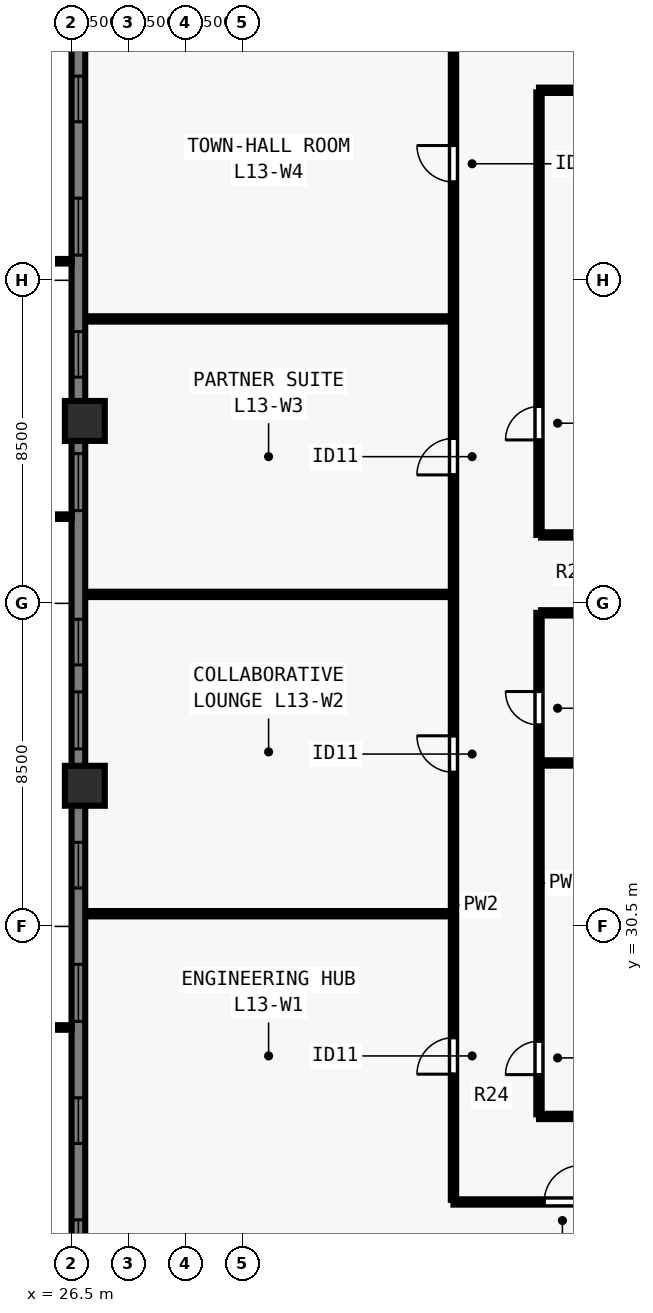
"""IFC4 building model, lengths in metres.
Left out: names, types, materials, properties, quantities, classifications, styles, units other than length and angle.
Written with IfcOpenShell. Run it as: python <this file> out.ifc"""

import sys

from ifc_helpers import new_model, si_unit, direction, frame, frame_2d, origin, origin_2d, place, context, subcontext, project, spatial, rectangle, extrude, element, fill, save


model = new_model("IFC4")
c1 = context("Model", 3, precision=1e-05, world=origin(), true_north=direction((0.0, 1.0)))
c2 = subcontext(c1, "Body", "Model", "MODEL_VIEW")
j1 = project(units=[si_unit("LENGTHUNIT", "METRE"), si_unit("PLANEANGLEUNIT", "RADIAN")], contexts=[c1])
p1 = place(None, origin())
s1 = spatial("IfcSite", under=j1, at=p1, CompositionType="ELEMENT")
p2 = place(p1, origin())
s2 = spatial("IfcBuilding", under=s1, at=p2, CompositionType="ELEMENT")
p3 = place(p2, frame((0.0, 0.0, 51.5)))
s3 = spatial("IfcBuildingStorey", under=s2, at=p3, CompositionType="ELEMENT", Elevation=51.5)
for number, where, z_axis, x_axis in (
    (1, (26.85, 43.8, 0.0), (0.0, 0.0, 1.0), (0.0, 1.0, 0.0)),
    (2, (26.85, 34.2, 0.0), (0.0, 0.0, 1.0), (0.0, 1.0, 0.0)),
):
    element("IfcColumn", number, at=place(p3, frame(where, z_axis=z_axis, x_axis=x_axis)), inside=s3, PredefinedType="COLUMN", context=c2, shape_type="SweptSolid", body=[
        extrude(rectangle(XDim=1.05, YDim=1.05, at=origin_2d()), origin(), (0.0, 0.0, 1.0), 3.5),
    ])
p4 = place(p3, frame((26.68, 16.5, 0.0), z_axis=(0.0, 0.0, 1.0), x_axis=(0.0, 1.0, 0.0)))
e3 = element("IfcWall", 3, at=p4, inside=s3, PredefinedType="SOLIDWALL", context=c2, shape_type="SweptSolid", body=[
    extrude(rectangle(XDim=44.662, YDim=0.36, at=frame_2d((22.331, 0.0))), origin(), (0.0, 0.0, 1.0), 3.28),
])
p5 = place(p4, frame((4.78, 0.0, 0.8)))
e4 = element("IfcOpeningElement", 4, at=p5, cuts=e3, PredefinedType="OPENING", context=c2, shape_type="SweptSolid", body=[
    extrude(rectangle(XDim=1.5, YDim=1.544, at=frame_2d((0.75, 0.772))), frame((0.0, 0.19, 0.0), z_axis=(0.0, -1.0, 0.0), x_axis=(1.0, 0.0, 0.0)), (0.0, 0.0, 1.0), 0.38),
])
p6 = place(p4, frame((8.29, 0.0, 0.8)))
e5 = element("IfcOpeningElement", 5, at=p6, cuts=e3, PredefinedType="OPENING", context=c2, shape_type="SweptSolid", body=[
    extrude(rectangle(XDim=1.2, YDim=1.544, at=frame_2d((0.6, 0.772))), frame((0.0, 0.19, 0.0), z_axis=(0.0, -1.0, 0.0), x_axis=(1.0, 0.0, 0.0)), (0.0, 0.0, 1.0), 0.38),
])
p7 = place(p4, frame((11.5, 0.0, 0.8)))
e6 = element("IfcOpeningElement", 6, at=p7, cuts=e3, PredefinedType="OPENING", context=c2, shape_type="SweptSolid", body=[
    extrude(rectangle(XDim=1.5, YDim=1.544, at=frame_2d((0.75, 0.772))), frame((0.0, 0.19, 0.0), z_axis=(0.0, -1.0, 0.0), x_axis=(1.0, 0.0, 0.0)), (0.0, 0.0, 1.0), 0.38),
])
p8 = place(p4, frame((15.01, 0.0, 0.8)))
e7 = element("IfcOpeningElement", 7, at=p8, cuts=e3, PredefinedType="OPENING", context=c2, shape_type="SweptSolid", body=[
    extrude(rectangle(XDim=1.2, YDim=1.544, at=frame_2d((0.6, 0.772))), frame((0.0, 0.19, 0.0), z_axis=(0.0, -1.0, 0.0), x_axis=(1.0, 0.0, 0.0)), (0.0, 0.0, 1.0), 0.38),
])
p9 = place(p4, frame((18.671, 0.0, 0.8)))
e8 = element("IfcOpeningElement", 8, at=p9, cuts=e3, PredefinedType="OPENING", context=c2, shape_type="SweptSolid", body=[
    extrude(rectangle(XDim=1.5, YDim=1.544, at=frame_2d((0.75, 0.772))), frame((0.0, 0.19, 0.0), z_axis=(0.0, -1.0, 0.0), x_axis=(1.0, 0.0, 0.0)), (0.0, 0.0, 1.0), 0.38),
])
p10 = place(p4, frame((20.881, 0.0, 0.8)))
e9 = element("IfcOpeningElement", 9, at=p10, cuts=e3, PredefinedType="OPENING", context=c2, shape_type="SweptSolid", body=[
    extrude(rectangle(XDim=1.2, YDim=1.544, at=frame_2d((0.6, 0.772))), frame((0.0, 0.19, 0.0), z_axis=(0.0, -1.0, 0.0), x_axis=(1.0, 0.0, 0.0)), (0.0, 0.0, 1.0), 0.38),
])
p11 = place(p4, frame((24.941, 0.0, 0.8)))
e10 = element("IfcOpeningElement", 10, at=p11, cuts=e3, PredefinedType="OPENING", context=c2, shape_type="SweptSolid", body=[
    extrude(rectangle(XDim=1.5, YDim=1.544, at=frame_2d((0.75, 0.772))), frame((0.0, 0.19, 0.0), z_axis=(0.0, -1.0, 0.0), x_axis=(1.0, 0.0, 0.0)), (0.0, 0.0, 1.0), 0.38),
])
p12 = place(p4, frame((28.451, 0.0, 0.8)))
e11 = element("IfcOpeningElement", 11, at=p12, cuts=e3, PredefinedType="OPENING", context=c2, shape_type="SweptSolid", body=[
    extrude(rectangle(XDim=1.2, YDim=1.544, at=frame_2d((0.6, 0.772))), frame((0.0, 0.19, 0.0), z_axis=(0.0, -1.0, 0.0), x_axis=(1.0, 0.0, 0.0)), (0.0, 0.0, 1.0), 0.38),
])
p13 = place(p4, frame((31.662, 0.0, 0.8)))
e12 = element("IfcOpeningElement", 12, at=p13, cuts=e3, PredefinedType="OPENING", context=c2, shape_type="SweptSolid", body=[
    extrude(rectangle(XDim=1.5, YDim=1.544, at=frame_2d((0.75, 0.772))), frame((0.0, 0.19, 0.0), z_axis=(0.0, -1.0, 0.0), x_axis=(1.0, 0.0, 0.0)), (0.0, 0.0, 1.0), 0.38),
])
p14 = place(p4, frame((35.172, 0.0, 0.8)))
e13 = element("IfcOpeningElement", 13, at=p14, cuts=e3, PredefinedType="OPENING", context=c2, shape_type="SweptSolid", body=[
    extrude(rectangle(XDim=1.2, YDim=1.544, at=frame_2d((0.6, 0.772))), frame((0.0, 0.19, 0.0), z_axis=(0.0, -1.0, 0.0), x_axis=(1.0, 0.0, 0.0)), (0.0, 0.0, 1.0), 0.38),
])
p15 = place(p4, frame((38.382, 0.0, 0.8)))
e14 = element("IfcOpeningElement", 14, at=p15, cuts=e3, PredefinedType="OPENING", context=c2, shape_type="SweptSolid", body=[
    extrude(rectangle(XDim=1.5, YDim=1.544, at=frame_2d((0.75, 0.772))), frame((0.0, 0.19, 0.0), z_axis=(0.0, -1.0, 0.0), x_axis=(1.0, 0.0, 0.0)), (0.0, 0.0, 1.0), 0.38),
])
p16 = place(p3, frame((36.55, 23.25, 0.0), z_axis=(0.0, 0.0, 1.0), x_axis=(1.0, 0.0, 0.0)))
e15 = element("IfcWall", 15, at=p16, inside=s3, PredefinedType="PARTITIONING", context=c2, shape_type="SweptSolid", body=[
    extrude(rectangle(XDim=30.9, YDim=0.14, at=frame_2d((15.45, 0.0))), origin(), (0.0, 0.0, 1.0), 3.28),
])
p17 = place(p16, frame((2.386, 0.0, 0.0)))
e16 = element("IfcOpeningElement", 16, at=p17, cuts=e15, PredefinedType="OPENING", context=c2, shape_type="SweptSolid", body=[
    extrude(rectangle(XDim=0.96, YDim=2.12, at=frame_2d((0.48, 1.06))), frame((0.0, 0.08, 0.0), z_axis=(0.0, -1.0, 0.0), x_axis=(1.0, 0.0, 0.0)), (0.0, 0.0, 1.0), 0.16),
])
p18 = place(p16, frame((27.066, 0.0, 0.0)))
e17 = element("IfcOpeningElement", 17, at=p18, cuts=e15, PredefinedType="OPENING", context=c2, shape_type="SweptSolid", body=[
    extrude(rectangle(XDim=0.96, YDim=2.12, at=frame_2d((0.48, 1.06))), frame((0.0, 0.08, 0.0), z_axis=(0.0, -1.0, 0.0), x_axis=(1.0, 0.0, 0.0)), (0.0, 0.0, 1.0), 0.16),
])
p19 = place(p3, frame((36.55, 23.305, 0.0), z_axis=(0.0, 0.0, 1.0), x_axis=(0.0, 1.0, 0.0)))
e18 = element("IfcWall", 18, at=p19, inside=s3, PredefinedType="PARTITIONING", context=c2, shape_type="SweptSolid", body=[
    extrude(rectangle(XDim=31.39, YDim=0.14, at=frame_2d((15.695, 0.0))), origin(), (0.0, 0.0, 1.0), 3.28),
])
p20 = place(p19, frame((3.307, 0.0, 0.0)))
e19 = element("IfcOpeningElement", 19, at=p20, cuts=e18, PredefinedType="OPENING", context=c2, shape_type="SweptSolid", body=[
    extrude(rectangle(XDim=0.96, YDim=2.12, at=frame_2d((0.48, 1.06))), frame((0.0, 0.08, 0.0), z_axis=(0.0, -1.0, 0.0), x_axis=(1.0, 0.0, 0.0)), (0.0, 0.0, 1.0), 0.16),
])
p21 = place(p19, frame((11.25, 0.0, 0.0)))
e20 = element("IfcOpeningElement", 20, at=p21, cuts=e18, PredefinedType="OPENING", context=c2, shape_type="SweptSolid", body=[
    extrude(rectangle(XDim=0.96, YDim=2.12, at=frame_2d((0.48, 1.06))), frame((0.0, 0.08, 0.0), z_axis=(0.0, -1.0, 0.0), x_axis=(1.0, 0.0, 0.0)), (0.0, 0.0, 1.0), 0.16),
])
p22 = place(p19, frame((19.075, 0.0, 0.0)))
e21 = element("IfcOpeningElement", 21, at=p22, cuts=e18, PredefinedType="OPENING", context=c2, shape_type="SweptSolid", body=[
    extrude(rectangle(XDim=0.96, YDim=2.12, at=frame_2d((0.48, 1.06))), frame((0.0, 0.08, 0.0), z_axis=(0.0, -1.0, 0.0), x_axis=(1.0, 0.0, 0.0)), (0.0, 0.0, 1.0), 0.16),
])
p23 = place(p19, frame((26.782, 0.0, 0.0)))
e22 = element("IfcOpeningElement", 22, at=p23, cuts=e18, PredefinedType="OPENING", context=c2, shape_type="SweptSolid", body=[
    extrude(rectangle(XDim=0.96, YDim=2.12, at=frame_2d((0.48, 1.06))), frame((0.0, 0.08, 0.0), z_axis=(0.0, -1.0, 0.0), x_axis=(1.0, 0.0, 0.0)), (0.0, 0.0, 1.0), 0.16),
])
p24 = place(p3, frame((38.8, 25.5, 0.0), z_axis=(0.0, 0.0, 1.0), x_axis=(1.0, 0.0, 0.0)))
e23 = element("IfcWall", 23, at=p24, inside=s3, PredefinedType="PARTITIONING", context=c2, shape_type="SweptSolid", body=[
    extrude(rectangle(XDim=26.4, YDim=0.14, at=frame_2d((13.2, 0.0))), origin(), (0.0, 0.0, 1.0), 3.28),
])
p25 = place(p24, frame((1.2, 0.0, 0.0)))
e24 = element("IfcOpeningElement", 24, at=p25, cuts=e23, PredefinedType="OPENING", context=c2, shape_type="SweptSolid", body=[
    extrude(rectangle(XDim=0.88, YDim=2.1, at=frame_2d((0.44, 1.05))), frame((0.0, 0.08, 0.0), z_axis=(0.0, -1.0, 0.0), x_axis=(1.0, 0.0, 0.0)), (0.0, 0.0, 1.0), 0.16),
])
p26 = place(p24, frame((9.7, 0.0, 0.0)))
e25 = element("IfcOpeningElement", 25, at=p26, cuts=e23, PredefinedType="OPENING", context=c2, shape_type="SweptSolid", body=[
    extrude(rectangle(XDim=0.88, YDim=2.1, at=frame_2d((0.44, 1.05))), frame((0.0, 0.08, 0.0), z_axis=(0.0, -1.0, 0.0), x_axis=(1.0, 0.0, 0.0)), (0.0, 0.0, 1.0), 0.16),
])
p27 = place(p24, frame((20.2, 0.0, 0.0)))
e26 = element("IfcOpeningElement", 26, at=p27, cuts=e23, PredefinedType="OPENING", context=c2, shape_type="SweptSolid", body=[
    extrude(rectangle(XDim=0.88, YDim=2.1, at=frame_2d((0.44, 1.05))), frame((0.0, 0.08, 0.0), z_axis=(0.0, -1.0, 0.0), x_axis=(1.0, 0.0, 0.0)), (0.0, 0.0, 1.0), 0.16),
])
p28 = place(p3, frame((38.8, 52.5, 0.0), z_axis=(0.0, 0.0, 1.0), x_axis=(1.0, 0.0, 0.0)))
e27 = element("IfcWall", 27, at=p28, inside=s3, PredefinedType="PARTITIONING", context=c2, shape_type="SweptSolid", body=[
    extrude(rectangle(XDim=26.4, YDim=0.14, at=frame_2d((13.2, 0.0))), origin(), (0.0, 0.0, 1.0), 3.28),
])
p29 = place(p28, frame((2.2, 0.0, 0.0)))
e28 = element("IfcOpeningElement", 28, at=p29, cuts=e27, PredefinedType="OPENING", context=c2, shape_type="SweptSolid", body=[
    extrude(rectangle(XDim=0.88, YDim=2.1, at=frame_2d((0.44, 1.05))), frame((0.0, 0.08, 0.0), z_axis=(0.0, -1.0, 0.0), x_axis=(1.0, 0.0, 0.0)), (0.0, 0.0, 1.0), 0.16),
])
p30 = place(p28, frame((13.7, 0.0, 0.0)))
e29 = element("IfcOpeningElement", 29, at=p30, cuts=e27, PredefinedType="OPENING", context=c2, shape_type="SweptSolid", body=[
    extrude(rectangle(XDim=0.88, YDim=2.1, at=frame_2d((0.44, 1.05))), frame((0.0, 0.08, 0.0), z_axis=(0.0, -1.0, 0.0), x_axis=(1.0, 0.0, 0.0)), (0.0, 0.0, 1.0), 0.16),
])
p31 = place(p28, frame((23.2, 0.0, 0.0)))
e30 = element("IfcOpeningElement", 30, at=p31, cuts=e27, PredefinedType="OPENING", context=c2, shape_type="SweptSolid", body=[
    extrude(rectangle(XDim=0.88, YDim=2.1, at=frame_2d((0.44, 1.05))), frame((0.0, 0.08, 0.0), z_axis=(0.0, -1.0, 0.0), x_axis=(1.0, 0.0, 0.0)), (0.0, 0.0, 1.0), 0.16),
])
p32 = place(p3, frame((38.8, 25.555, 0.0), z_axis=(0.0, 0.0, 1.0), x_axis=(0.0, 1.0, 0.0)))
e31 = element("IfcWall", 31, at=p32, inside=s3, PredefinedType="PARTITIONING", context=c2, shape_type="SweptSolid", body=[
    extrude(rectangle(XDim=13.195, YDim=0.14, at=frame_2d((6.598, 0.0))), origin(), (0.0, 0.0, 1.0), 3.28),
])
p33 = place(p32, frame((1.045, 0.0, 0.0)))
e32 = element("IfcOpeningElement", 32, at=p33, cuts=e31, PredefinedType="OPENING", context=c2, shape_type="SweptSolid", body=[
    extrude(rectangle(XDim=0.88, YDim=2.1, at=frame_2d((0.44, 1.05))), frame((0.0, 0.08, 0.0), z_axis=(0.0, -1.0, 0.0), x_axis=(1.0, 0.0, 0.0)), (0.0, 0.0, 1.0), 0.16),
])
p34 = place(p32, frame((10.245, 0.0, 0.0)))
e33 = element("IfcOpeningElement", 33, at=p34, cuts=e31, PredefinedType="OPENING", context=c2, shape_type="SweptSolid", body=[
    extrude(rectangle(XDim=0.88, YDim=2.1, at=frame_2d((0.44, 1.05))), frame((0.0, 0.08, 0.0), z_axis=(0.0, -1.0, 0.0), x_axis=(1.0, 0.0, 0.0)), (0.0, 0.0, 1.0), 0.16),
])
p35 = place(p3, frame((38.8, 40.8, 0.0), z_axis=(0.0, 0.0, 1.0), x_axis=(0.0, 1.0, 0.0)))
e34 = element("IfcWall", 34, at=p35, inside=s3, PredefinedType="PARTITIONING", context=c2, shape_type="SweptSolid", body=[
    extrude(rectangle(XDim=11.645, YDim=0.14, at=frame_2d((5.823, 0.0))), origin(), (0.0, 0.0, 1.0), 3.28),
])
p36 = place(p35, frame((2.5, 0.0, 0.0)))
e35 = element("IfcOpeningElement", 35, at=p36, cuts=e34, PredefinedType="OPENING", context=c2, shape_type="SweptSolid", body=[
    extrude(rectangle(XDim=0.88, YDim=2.1, at=frame_2d((0.44, 1.05))), frame((0.0, 0.08, 0.0), z_axis=(0.0, -1.0, 0.0), x_axis=(1.0, 0.0, 0.0)), (0.0, 0.0, 1.0), 0.16),
])
for number, where, z_axis, x_axis in (
    (36, (38.855, 38.75, 0.0), (0.0, 0.0, 1.0), (1.0, 0.0, 0.0)),
    (37, (38.855, 40.8, 0.0), (0.0, 0.0, 1.0), (1.0, 0.0, 0.0)),
    (38, (38.855, 34.8, 0.0), (0.0, 0.0, 1.0), (1.0, 0.0, 0.0)),
):
    element("IfcWall", number, at=place(p3, frame(where, z_axis=z_axis, x_axis=x_axis)), inside=s3, PredefinedType="PARTITIONING", context=c2, shape_type="SweptSolid", body=[
        extrude(rectangle(XDim=4.385, YDim=0.14, at=frame_2d((2.192, 0.0))), origin(), (0.0, 0.0, 1.0), 3.28),
    ])
p37 = place(p3, frame((26.92, 30.834, 0.0), z_axis=(0.0, 0.0, 1.0), x_axis=(1.0, 0.0, 0.0)))
e39 = element("IfcWall", 39, at=p37, inside=s3, PredefinedType="PARTITIONING", context=c2, shape_type="SweptSolid", body=[
    extrude(rectangle(XDim=9.53, YDim=0.14, at=frame_2d((4.765, 0.0))), origin(), (0.0, 0.0, 1.0), 3.28),
])
p38 = place(p3, frame((26.92, 39.236, 0.0), z_axis=(0.0, 0.0, 1.0), x_axis=(1.0, 0.0, 0.0)))
e40 = element("IfcWall", 40, at=p38, inside=s3, PredefinedType="PARTITIONING", context=c2, shape_type="SweptSolid", body=[
    extrude(rectangle(XDim=9.53, YDim=0.14, at=frame_2d((4.765, 0.0))), origin(), (0.0, 0.0, 1.0), 2.849),
])
p39 = place(p3, frame((26.92, 46.484, 0.0), z_axis=(0.0, 0.0, 1.0), x_axis=(1.0, 0.0, 0.0)))
e41 = element("IfcWall", 41, at=p39, inside=s3, PredefinedType="PARTITIONING", context=c2, shape_type="SweptSolid", body=[
    extrude(rectangle(XDim=9.53, YDim=0.14, at=frame_2d((4.765, 0.0))), origin(), (0.0, 0.0, 1.0), 3.28),
])
p40 = place(p5, origin())
e42 = element("IfcWindow", 42, at=p40, inside=s3, PartitioningType="SINGLE_PANEL", PredefinedType="WINDOW", context=c2, shape_type="SweptSolid", body=[
    extrude(rectangle(XDim=1.5, YDim=1.544, at=frame_2d((0.75, 0.772))), frame((0.0, -0.05, 0.0), z_axis=(0.0, -1.0, 0.0), x_axis=(1.0, 0.0, 0.0)), (0.0, 0.0, 1.0), 0.06),
])
fill(e4, e42)
p41 = place(p6, origin())
e43 = element("IfcWindow", 43, at=p41, inside=s3, PartitioningType="SINGLE_PANEL", PredefinedType="WINDOW", context=c2, shape_type="SweptSolid", body=[
    extrude(rectangle(XDim=1.2, YDim=1.544, at=frame_2d((0.6, 0.772))), frame((0.0, -0.05, 0.0), z_axis=(0.0, -1.0, 0.0), x_axis=(1.0, 0.0, 0.0)), (0.0, 0.0, 1.0), 0.06),
])
fill(e5, e43)
p42 = place(p7, origin())
e44 = element("IfcWindow", 44, at=p42, inside=s3, PartitioningType="SINGLE_PANEL", PredefinedType="WINDOW", context=c2, shape_type="SweptSolid", body=[
    extrude(rectangle(XDim=1.5, YDim=1.544, at=frame_2d((0.75, 0.772))), frame((0.0, -0.05, 0.0), z_axis=(0.0, -1.0, 0.0), x_axis=(1.0, 0.0, 0.0)), (0.0, 0.0, 1.0), 0.06),
])
fill(e6, e44)
p43 = place(p8, origin())
e45 = element("IfcWindow", 45, at=p43, inside=s3, PartitioningType="SINGLE_PANEL", PredefinedType="WINDOW", context=c2, shape_type="SweptSolid", body=[
    extrude(rectangle(XDim=1.2, YDim=1.544, at=frame_2d((0.6, 0.772))), frame((0.0, -0.05, 0.0), z_axis=(0.0, -1.0, 0.0), x_axis=(1.0, 0.0, 0.0)), (0.0, 0.0, 1.0), 0.06),
])
fill(e7, e45)
p44 = place(p9, origin())
e46 = element("IfcWindow", 46, at=p44, inside=s3, PartitioningType="SINGLE_PANEL", PredefinedType="WINDOW", context=c2, shape_type="SweptSolid", body=[
    extrude(rectangle(XDim=1.5, YDim=1.544, at=frame_2d((0.75, 0.772))), frame((0.0, -0.05, 0.0), z_axis=(0.0, -1.0, 0.0), x_axis=(1.0, 0.0, 0.0)), (0.0, 0.0, 1.0), 0.06),
])
fill(e8, e46)
p45 = place(p10, origin())
e47 = element("IfcWindow", 47, at=p45, inside=s3, PartitioningType="SINGLE_PANEL", PredefinedType="WINDOW", context=c2, shape_type="SweptSolid", body=[
    extrude(rectangle(XDim=1.2, YDim=1.544, at=frame_2d((0.6, 0.772))), frame((0.0, -0.05, 0.0), z_axis=(0.0, -1.0, 0.0), x_axis=(1.0, 0.0, 0.0)), (0.0, 0.0, 1.0), 0.06),
])
fill(e9, e47)
p46 = place(p11, origin())
e48 = element("IfcWindow", 48, at=p46, inside=s3, PartitioningType="SINGLE_PANEL", PredefinedType="WINDOW", context=c2, shape_type="SweptSolid", body=[
    extrude(rectangle(XDim=1.5, YDim=1.544, at=frame_2d((0.75, 0.772))), frame((0.0, -0.05, 0.0), z_axis=(0.0, -1.0, 0.0), x_axis=(1.0, 0.0, 0.0)), (0.0, 0.0, 1.0), 0.06),
])
fill(e10, e48)
p47 = place(p12, origin())
e49 = element("IfcWindow", 49, at=p47, inside=s3, PartitioningType="SINGLE_PANEL", PredefinedType="WINDOW", context=c2, shape_type="SweptSolid", body=[
    extrude(rectangle(XDim=1.2, YDim=1.544, at=frame_2d((0.6, 0.772))), frame((0.0, -0.05, 0.0), z_axis=(0.0, -1.0, 0.0), x_axis=(1.0, 0.0, 0.0)), (0.0, 0.0, 1.0), 0.06),
])
fill(e11, e49)
p48 = place(p13, origin())
e50 = element("IfcWindow", 50, at=p48, inside=s3, PartitioningType="SINGLE_PANEL", PredefinedType="WINDOW", context=c2, shape_type="SweptSolid", body=[
    extrude(rectangle(XDim=1.5, YDim=1.544, at=frame_2d((0.75, 0.772))), frame((0.0, -0.05, 0.0), z_axis=(0.0, -1.0, 0.0), x_axis=(1.0, 0.0, 0.0)), (0.0, 0.0, 1.0), 0.06),
])
fill(e12, e50)
p49 = place(p14, origin())
e51 = element("IfcWindow", 51, at=p49, inside=s3, PartitioningType="SINGLE_PANEL", PredefinedType="WINDOW", context=c2, shape_type="SweptSolid", body=[
    extrude(rectangle(XDim=1.2, YDim=1.544, at=frame_2d((0.6, 0.772))), frame((0.0, -0.05, 0.0), z_axis=(0.0, -1.0, 0.0), x_axis=(1.0, 0.0, 0.0)), (0.0, 0.0, 1.0), 0.06),
])
fill(e13, e51)
p50 = place(p33, origin())
e52 = element("IfcDoor", 52, at=p50, inside=s3, OperationType="SINGLE_SWING_LEFT", PredefinedType="DOOR", context=c2, shape_type="SweptSolid", body=[
    extrude(rectangle(XDim=0.88, YDim=2.1, at=frame_2d((0.44, 1.05))), frame((0.0, 0.025, 0.0), z_axis=(0.0, -1.0, 0.0), x_axis=(1.0, 0.0, 0.0)), (0.0, 0.0, 1.0), 0.05),
])
fill(e32, e52)
p51 = place(p34, origin())
e53 = element("IfcDoor", 53, at=p51, inside=s3, OperationType="SINGLE_SWING_RIGHT", PredefinedType="DOOR", context=c2, shape_type="SweptSolid", body=[
    extrude(rectangle(XDim=0.88, YDim=2.1, at=frame_2d((0.44, 1.05))), frame((0.0, 0.025, 0.0), z_axis=(0.0, -1.0, 0.0), x_axis=(1.0, 0.0, 0.0)), (0.0, 0.0, 1.0), 0.05),
])
fill(e33, e53)
p52 = place(p36, origin())
e54 = element("IfcDoor", 54, at=p52, inside=s3, OperationType="SINGLE_SWING_LEFT", PredefinedType="DOOR", context=c2, shape_type="SweptSolid", body=[
    extrude(rectangle(XDim=0.88, YDim=2.1, at=frame_2d((0.44, 1.05))), frame((0.0, 0.025, 0.0), z_axis=(0.0, -1.0, 0.0), x_axis=(1.0, 0.0, 0.0)), (0.0, 0.0, 1.0), 0.05),
])
fill(e35, e54)
p53 = place(p17, origin())
e55 = element("IfcDoor", 55, at=p53, inside=s3, OperationType="SINGLE_SWING_RIGHT", PredefinedType="DOOR", context=c2, shape_type="SweptSolid", body=[
    extrude(rectangle(XDim=0.96, YDim=2.12, at=frame_2d((0.48, 1.06))), frame((0.0, 0.025, 0.0), z_axis=(0.0, -1.0, 0.0), x_axis=(1.0, 0.0, 0.0)), (0.0, 0.0, 1.0), 0.05),
])
fill(e16, e55)
p54 = place(p20, origin())
e56 = element("IfcDoor", 56, at=p54, inside=s3, OperationType="SINGLE_SWING_LEFT", PredefinedType="DOOR", context=c2, shape_type="SweptSolid", body=[
    extrude(rectangle(XDim=0.96, YDim=2.12, at=frame_2d((0.48, 1.06))), frame((0.0, 0.025, 0.0), z_axis=(0.0, -1.0, 0.0), x_axis=(1.0, 0.0, 0.0)), (0.0, 0.0, 1.0), 0.05),
])
fill(e19, e56)
p55 = place(p21, origin())
e57 = element("IfcDoor", 57, at=p55, inside=s3, OperationType="SINGLE_SWING_RIGHT", PredefinedType="DOOR", context=c2, shape_type="SweptSolid", body=[
    extrude(rectangle(XDim=0.96, YDim=2.12, at=frame_2d((0.48, 1.06))), frame((0.0, 0.025, 0.0), z_axis=(0.0, -1.0, 0.0), x_axis=(1.0, 0.0, 0.0)), (0.0, 0.0, 1.0), 0.05),
])
fill(e20, e57)
p56 = place(p22, origin())
e58 = element("IfcDoor", 58, at=p56, inside=s3, OperationType="SINGLE_SWING_LEFT", PredefinedType="DOOR", context=c2, shape_type="SweptSolid", body=[
    extrude(rectangle(XDim=0.96, YDim=2.12, at=frame_2d((0.48, 1.06))), frame((0.0, 0.025, 0.0), z_axis=(0.0, -1.0, 0.0), x_axis=(1.0, 0.0, 0.0)), (0.0, 0.0, 1.0), 0.05),
])
fill(e21, e58)
p57 = place(p23, origin())
e59 = element("IfcDoor", 59, at=p57, inside=s3, OperationType="SINGLE_SWING_RIGHT", PredefinedType="DOOR", context=c2, shape_type="SweptSolid", body=[
    extrude(rectangle(XDim=0.96, YDim=2.12, at=frame_2d((0.48, 1.06))), frame((0.0, 0.025, 0.0), z_axis=(0.0, -1.0, 0.0), x_axis=(1.0, 0.0, 0.0)), (0.0, 0.0, 1.0), 0.05),
])
fill(e22, e59)
save(model, sys.argv[1])
